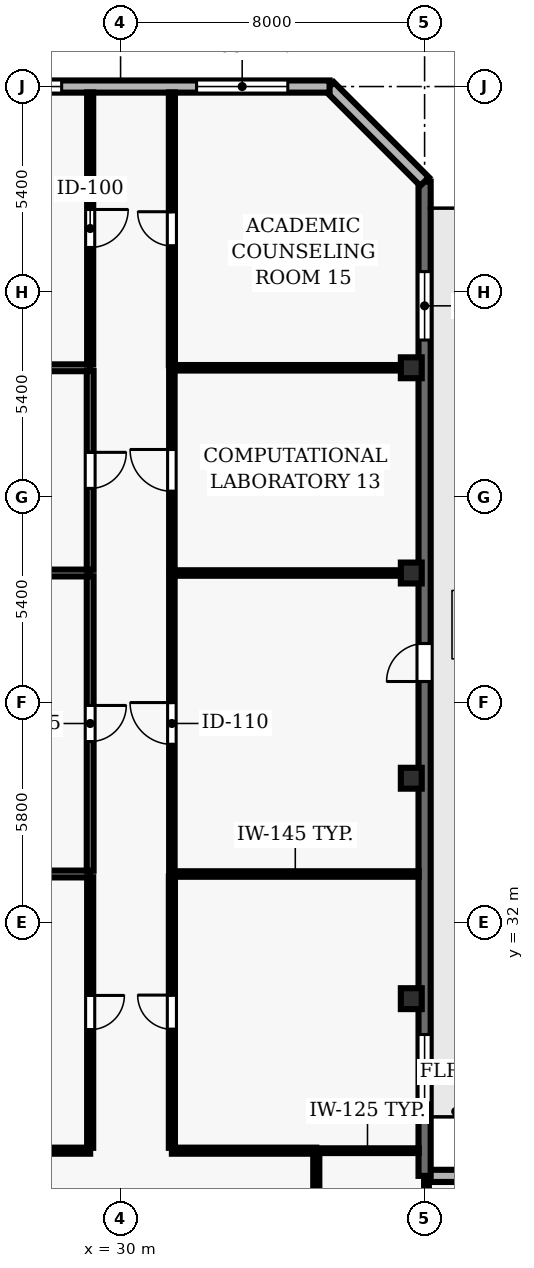
"""IFC4 building model, lengths in metres.
Left out: names, types, materials, properties, quantities, classifications, styles, units other than length and angle.
Written with IfcOpenShell. Run it as: python <this file> out.ifc"""

import sys

from ifc_helpers import new_model, si_unit, direction, frame, frame_2d, origin, origin_2d, place, context, subcontext, project, spatial, rectangle, hollow_rectangle, extrude, element, fill, save


model = new_model("IFC4")
c1 = context("Model", 3, precision=1e-05, world=origin(), true_north=direction((0.0, 1.0)))
c2 = subcontext(c1, "Body", "Model", "MODEL_VIEW")
j1 = project(units=[si_unit("LENGTHUNIT", "METRE"), si_unit("PLANEANGLEUNIT", "RADIAN")], contexts=[c1])
p1 = place(None, origin())
s1 = spatial("IfcSite", under=j1, at=p1, CompositionType="ELEMENT")
p2 = place(p1, origin())
s2 = spatial("IfcBuilding", under=s1, at=p2, CompositionType="ELEMENT")
p3 = place(p2, frame((0.0, 0.0, 77.8)))
s3 = spatial("IfcBuildingStorey", under=s2, at=p3, CompositionType="ELEMENT", Elevation=77.8)
for number, where, z_axis, x_axis in (
    (1, (37.65, 30.0, 0.0), (0.0, 0.0, 1.0), (1.0, 0.0, 0.0)),
    (2, (37.65, 35.8, 0.0), (0.0, 0.0, 1.0), (1.0, 0.0, 0.0)),
    (3, (37.65, 41.2, 0.0), (0.0, 0.0, 1.0), (1.0, 0.0, 0.0)),
    (4, (37.65, 46.6, 0.0), (0.0, 0.0, 1.0), (1.0, 0.0, 0.0)),
):
    element("IfcColumn", number, at=place(p3, frame(where, z_axis=z_axis, x_axis=x_axis)), inside=s3, PredefinedType="COLUMN", context=c2, shape_type="SweptSolid", body=[
        extrude(hollow_rectangle(XDim=0.55, YDim=0.55, WallThickness=0.025, at=origin_2d()), origin(), (0.0, 0.0, 1.0), 3.9),
    ])
p4 = place(p3, frame((47.05, 25.337, 0.0), z_axis=(0.0, 0.0, 1.0), x_axis=(-1.0, 0.0, 0.0)))
e5 = element("IfcWall", 5, at=p4, inside=s3, PredefinedType="SOLIDWALL", context=c2, shape_type="SweptSolid", body=[
    extrude(rectangle(XDim=9.05, YDim=0.32, at=frame_2d((4.525, 0.0))), origin(), (0.0, 0.0, 1.0), 3.69),
])
p5 = place(p4, frame((3.775, 0.0, 0.9)))
e6 = element("IfcOpeningElement", 6, at=p5, cuts=e5, PredefinedType="OPENING", context=c2, shape_type="SweptSolid", body=[
    extrude(rectangle(XDim=1.5, YDim=1.6, at=frame_2d((0.75, 0.8))), frame((0.0, 0.17, 0.0), z_axis=(0.0, -1.0, 0.0), x_axis=(1.0, 0.0, 0.0)), (0.0, 0.0, 1.0), 0.34),
])
p6 = place(p3, frame((38.0, 25.337, 0.0), z_axis=(0.0, 0.0, 1.0), x_axis=(0.0, 1.0, 0.0)))
e7 = element("IfcWall", 7, at=p6, inside=s3, PredefinedType="SOLIDWALL", context=c2, shape_type="SweptSolid", body=[
    extrude(rectangle(XDim=26.163, YDim=0.32, at=frame_2d((13.082, 0.0))), origin(), (0.0, 0.0, 1.0), 3.69),
])
p7 = place(p6, frame((13.008, 0.0, 0.0)))
e8 = element("IfcOpeningElement", 8, at=p7, cuts=e7, PredefinedType="OPENING", context=c2, shape_type="SweptSolid", body=[
    extrude(rectangle(XDim=1.0, YDim=2.2, at=frame_2d((0.5, 1.1))), frame((0.0, 0.17, 0.0), z_axis=(0.0, -1.0, 0.0), x_axis=(1.0, 0.0, 0.0)), (0.0, 0.0, 1.0), 0.34),
])
p8 = place(p6, frame((1.92, 0.0, 0.9)))
e9 = element("IfcOpeningElement", 9, at=p8, cuts=e7, PredefinedType="OPENING", context=c2, shape_type="SweptSolid", body=[
    extrude(rectangle(XDim=1.8, YDim=1.6, at=frame_2d((0.9, 0.8))), frame((0.0, 0.17, 0.0), z_axis=(0.0, -1.0, 0.0), x_axis=(1.0, 0.0, 0.0)), (0.0, 0.0, 1.0), 0.34),
])
p9 = place(p6, frame((21.993, 0.0, 0.9)))
e10 = element("IfcOpeningElement", 10, at=p9, cuts=e7, PredefinedType="OPENING", context=c2, shape_type="SweptSolid", body=[
    extrude(rectangle(XDim=1.8, YDim=1.6, at=frame_2d((0.9, 0.8))), frame((0.0, 0.17, 0.0), z_axis=(0.0, -1.0, 0.0), x_axis=(1.0, 0.0, 0.0)), (0.0, 0.0, 1.0), 0.34),
])
p10 = place(p3, frame((38.0, 51.5, 0.0), z_axis=(0.0, 0.0, 1.0), x_axis=(-0.707106781187, 0.707106781187, 0.0)))
e11 = element("IfcWall", 11, at=p10, inside=s3, PredefinedType="SOLIDWALL", context=c2, shape_type="SweptSolid", body=[
    extrude(rectangle(XDim=3.536, YDim=0.32, at=frame_2d((1.768, 0.0))), origin(), (0.0, 0.0, 1.0), 3.69),
])
p11 = place(p3, frame((35.5, 54.0, 0.0), z_axis=(0.0, 0.0, 1.0), x_axis=(-1.0, 0.0, 0.0)))
e12 = element("IfcWall", 12, at=p11, inside=s3, PredefinedType="SOLIDWALL", context=c2, shape_type="SweptSolid", body=[
    extrude(rectangle(XDim=11.0, YDim=0.32, at=frame_2d((5.5, 0.0))), origin(), (0.0, 0.0, 1.0), 3.69),
])
p12 = place(p11, frame((1.1, 0.0, 0.9)))
e13 = element("IfcOpeningElement", 13, at=p12, cuts=e12, PredefinedType="OPENING", context=c2, shape_type="SweptSolid", body=[
    extrude(rectangle(XDim=2.4, YDim=1.6, at=frame_2d((1.2, 0.8))), frame((0.0, 0.17, 0.0), z_axis=(0.0, -1.0, 0.0), x_axis=(1.0, 0.0, 0.0)), (0.0, 0.0, 1.0), 0.34),
])
p13 = place(p11, frame((7.05, 0.0, 0.9)))
e14 = element("IfcOpeningElement", 14, at=p13, cuts=e12, PredefinedType="OPENING", context=c2, shape_type="SweptSolid", body=[
    extrude(rectangle(XDim=2.4, YDim=1.6, at=frame_2d((1.2, 0.8))), frame((0.0, 0.17, 0.0), z_axis=(0.0, -1.0, 0.0), x_axis=(1.0, 0.0, 0.0)), (0.0, 0.0, 1.0), 0.34),
])
p14 = place(p3, frame((29.2, 26.0, 0.0), z_axis=(0.0, 0.0, 1.0), x_axis=(-1.0, 0.0, 0.0)))
e15 = element("IfcWall", 15, at=p14, inside=s3, PredefinedType="PARTITIONING", context=c2, shape_type="SweptSolid", body=[
    extrude(rectangle(XDim=7.045, YDim=0.16, at=frame_2d((3.522, 0.0))), origin(), (0.0, 0.0, 1.0), 3.69),
])
p15 = place(p3, frame((29.2, 33.28, 0.0), z_axis=(0.0, 0.0, 1.0), x_axis=(-1.0, 0.0, 0.0)))
e16 = element("IfcWall", 16, at=p15, inside=s3, PredefinedType="PARTITIONING", context=c2, shape_type="SweptSolid", body=[
    extrude(rectangle(XDim=7.045, YDim=0.18, at=frame_2d((3.522, 0.0))), origin(), (0.0, 0.0, 1.0), 3.227),
])
for number, where, z_axis, x_axis in (
    (17, (29.2, 41.2, 0.0), (0.0, 0.0, 1.0), (-1.0, 0.0, 0.0)),
    (18, (29.2, 46.6, 0.0), (0.0, 0.0, 1.0), (-1.0, 0.0, 0.0)),
):
    element("IfcWall", number, at=place(p3, frame(where, z_axis=z_axis, x_axis=x_axis)), inside=s3, PredefinedType="PARTITIONING", context=c2, shape_type="SweptSolid", body=[
        extrude(rectangle(XDim=7.045, YDim=0.18, at=frame_2d((3.522, 0.0))), origin(), (0.0, 0.0, 1.0), 2.995),
    ])
p16 = place(p3, frame((35.15, 26.0, 0.0), z_axis=(0.0, 0.0, 1.0), x_axis=(-1.0, 0.0, 0.0)))
e19 = element("IfcWall", 19, at=p16, inside=s3, PredefinedType="PARTITIONING", context=c2, shape_type="SweptSolid", body=[
    extrude(rectangle(XDim=3.8, YDim=0.16, at=frame_2d((1.9, 0.0))), origin(), (0.0, 0.0, 1.0), 3.69),
])
p17 = place(p3, frame((35.15, 26.0, 0.0), z_axis=(0.0, 0.0, 1.0), x_axis=(1.0, 0.0, 0.0)))
e20 = element("IfcWall", 20, at=p17, inside=s3, PredefinedType="PARTITIONING", context=c2, shape_type="SweptSolid", body=[
    extrude(rectangle(XDim=2.695, YDim=0.125, at=frame_2d((1.348, 0.0))), origin(), (0.0, 0.0, 1.0), 3.69),
])
p18 = place(p3, frame((37.845, 33.28, 0.0), z_axis=(0.0, 0.0, 1.0), x_axis=(-1.0, 0.0, 0.0)))
e21 = element("IfcWall", 21, at=p18, inside=s3, PredefinedType="PARTITIONING", context=c2, shape_type="SweptSolid", body=[
    extrude(rectangle(XDim=6.495, YDim=0.145, at=frame_2d((3.248, 0.0))), origin(), (0.0, 0.0, 1.0), 3.227),
])
for number, where, z_axis, x_axis in (
    (22, (37.845, 41.2, 0.0), (0.0, 0.0, 1.0), (-1.0, 0.0, 0.0)),
    (23, (37.845, 46.6, 0.0), (0.0, 0.0, 1.0), (-1.0, 0.0, 0.0)),
):
    element("IfcWall", number, at=place(p3, frame(where, z_axis=z_axis, x_axis=x_axis)), inside=s3, PredefinedType="PARTITIONING", context=c2, shape_type="SweptSolid", body=[
        extrude(rectangle(XDim=6.495, YDim=0.145, at=frame_2d((3.248, 0.0))), origin(), (0.0, 0.0, 1.0), 2.995),
    ])
p19 = place(p3, frame((29.2, 33.195, 0.0), z_axis=(0.0, 0.0, 1.0), x_axis=(0.0, -1.0, 0.0)))
e24 = element("IfcWall", 24, at=p19, inside=s3, PredefinedType="PARTITIONING", context=c2, shape_type="SweptSolid", body=[
    extrude(rectangle(XDim=7.12, YDim=0.16, at=frame_2d((3.56, 0.0))), origin(), (0.0, 0.0, 1.0), 3.69),
])
p20 = place(p19, frame((3.11, 0.0, 0.0)))
e25 = element("IfcOpeningElement", 25, at=p20, cuts=e24, PredefinedType="OPENING", context=c2, shape_type="SweptSolid", body=[
    extrude(rectangle(XDim=0.9, YDim=2.1, at=frame_2d((0.45, 1.05))), frame((0.0, 0.09, 0.0), z_axis=(0.0, -1.0, 0.0), x_axis=(1.0, 0.0, 0.0)), (0.0, 0.0, 1.0), 0.18),
])
p21 = place(p3, frame((29.2, 41.115, 0.0), z_axis=(0.0, 0.0, 1.0), x_axis=(0.0, -1.0, 0.0)))
e26 = element("IfcWall", 26, at=p21, inside=s3, PredefinedType="PARTITIONING", context=c2, shape_type="SweptSolid", body=[
    extrude(rectangle(XDim=7.75, YDim=0.18, at=frame_2d((3.875, 0.0))), origin(), (0.0, 0.0, 1.0), 3.69),
])
p22 = place(p21, frame((3.4, 0.0, 0.0)))
e27 = element("IfcOpeningElement", 27, at=p22, cuts=e26, PredefinedType="OPENING", context=c2, shape_type="SweptSolid", body=[
    extrude(rectangle(XDim=0.95, YDim=2.1, at=frame_2d((0.475, 1.05))), frame((0.0, 0.1, 0.0), z_axis=(0.0, -1.0, 0.0), x_axis=(1.0, 0.0, 0.0)), (0.0, 0.0, 1.0), 0.2),
])
p23 = place(p3, frame((29.2, 46.515, 0.0), z_axis=(0.0, 0.0, 1.0), x_axis=(0.0, -1.0, 0.0)))
e28 = element("IfcWall", 28, at=p23, inside=s3, PredefinedType="PARTITIONING", context=c2, shape_type="SweptSolid", body=[
    extrude(rectangle(XDim=5.23, YDim=0.18, at=frame_2d((2.615, 0.0))), origin(), (0.0, 0.0, 1.0), 3.69),
])
p24 = place(p23, frame((2.14, 0.0, 0.0)))
e29 = element("IfcOpeningElement", 29, at=p24, cuts=e28, PredefinedType="OPENING", context=c2, shape_type="SweptSolid", body=[
    extrude(rectangle(XDim=0.95, YDim=2.1, at=frame_2d((0.475, 1.05))), frame((0.0, 0.1, 0.0), z_axis=(0.0, -1.0, 0.0), x_axis=(1.0, 0.0, 0.0)), (0.0, 0.0, 1.0), 0.2),
])
p25 = place(p3, frame((29.2, 53.845, 0.0), z_axis=(0.0, 0.0, 1.0), x_axis=(0.0, -1.0, 0.0)))
e30 = element("IfcWall", 30, at=p25, inside=s3, PredefinedType="PARTITIONING", context=c2, shape_type="SweptSolid", body=[
    extrude(rectangle(XDim=7.16, YDim=0.16, at=frame_2d((3.58, 0.0))), origin(), (0.0, 0.0, 1.0), 3.69),
])
p26 = place(p25, frame((3.08, 0.0, 0.0)))
e31 = element("IfcOpeningElement", 31, at=p26, cuts=e30, PredefinedType="OPENING", context=c2, shape_type="SweptSolid", body=[
    extrude(rectangle(XDim=1.0, YDim=2.1, at=frame_2d((0.5, 1.05))), frame((0.0, 0.09, 0.0), z_axis=(0.0, -1.0, 0.0), x_axis=(1.0, 0.0, 0.0)), (0.0, 0.0, 1.0), 0.18),
])
p27 = place(p3, frame((31.35, 26.075, 0.0), z_axis=(0.0, 0.0, 1.0), x_axis=(0.0, 1.0, 0.0)))
e32 = element("IfcWall", 32, at=p27, inside=s3, PredefinedType="PARTITIONING", context=c2, shape_type="SweptSolid", body=[
    extrude(rectangle(XDim=7.137, YDim=0.16, at=frame_2d((3.568, 0.0))), origin(), (0.0, 0.0, 1.0), 3.69),
])
p28 = place(p27, frame((3.119, 0.0, 0.0)))
e33 = element("IfcOpeningElement", 33, at=p28, cuts=e32, PredefinedType="OPENING", context=c2, shape_type="SweptSolid", body=[
    extrude(rectangle(XDim=0.9, YDim=2.1, at=frame_2d((0.45, 1.05))), frame((0.0, 0.09, 0.0), z_axis=(0.0, -1.0, 0.0), x_axis=(1.0, 0.0, 0.0)), (0.0, 0.0, 1.0), 0.18),
])
p29 = place(p3, frame((31.35, 33.348, 0.0), z_axis=(0.0, 0.0, 1.0), x_axis=(0.0, 1.0, 0.0)))
e34 = element("IfcWall", 34, at=p29, inside=s3, PredefinedType="PARTITIONING", context=c2, shape_type="SweptSolid", body=[
    extrude(rectangle(XDim=7.785, YDim=0.145, at=frame_2d((3.893, 0.0))), origin(), (0.0, 0.0, 1.0), 3.69),
])
p30 = place(p29, frame((3.343, 0.0, 0.0)))
e35 = element("IfcOpeningElement", 35, at=p30, cuts=e34, PredefinedType="OPENING", context=c2, shape_type="SweptSolid", body=[
    extrude(rectangle(XDim=1.1, YDim=2.15, at=frame_2d((0.55, 1.075))), frame((0.0, 0.083, 0.0), z_axis=(0.0, -1.0, 0.0), x_axis=(1.0, 0.0, 0.0)), (0.0, 0.0, 1.0), 0.165),
])
p31 = place(p3, frame((31.35, 41.268, 0.0), z_axis=(0.0, 0.0, 1.0), x_axis=(0.0, 1.0, 0.0)))
e36 = element("IfcWall", 36, at=p31, inside=s3, PredefinedType="PARTITIONING", context=c2, shape_type="SweptSolid", body=[
    extrude(rectangle(XDim=5.264, YDim=0.145, at=frame_2d((2.632, 0.0))), origin(), (0.0, 0.0, 1.0), 3.69),
])
p32 = place(p31, frame((2.082, 0.0, 0.0)))
e37 = element("IfcOpeningElement", 37, at=p32, cuts=e36, PredefinedType="OPENING", context=c2, shape_type="SweptSolid", body=[
    extrude(rectangle(XDim=1.1, YDim=2.15, at=frame_2d((0.55, 1.075))), frame((0.0, 0.083, 0.0), z_axis=(0.0, -1.0, 0.0), x_axis=(1.0, 0.0, 0.0)), (0.0, 0.0, 1.0), 0.165),
])
p33 = place(p3, frame((31.35, 46.668, 0.0), z_axis=(0.0, 0.0, 1.0), x_axis=(0.0, 1.0, 0.0)))
e38 = element("IfcWall", 38, at=p33, inside=s3, PredefinedType="PARTITIONING", context=c2, shape_type="SweptSolid", body=[
    extrude(rectangle(XDim=7.177, YDim=0.16, at=frame_2d((3.588, 0.0))), origin(), (0.0, 0.0, 1.0), 3.69),
])
p34 = place(p33, frame((3.138, 0.0, 0.0)))
e39 = element("IfcOpeningElement", 39, at=p34, cuts=e38, PredefinedType="OPENING", context=c2, shape_type="SweptSolid", body=[
    extrude(rectangle(XDim=0.9, YDim=2.1, at=frame_2d((0.45, 1.05))), frame((0.0, 0.09, 0.0), z_axis=(0.0, -1.0, 0.0), x_axis=(1.0, 0.0, 0.0)), (0.0, 0.0, 1.0), 0.18),
])
p35 = place(p3, frame((35.15, 24.07, 0.0), z_axis=(0.0, 0.0, 1.0), x_axis=(0.0, 1.0, 0.0)))
e40 = element("IfcWall", 40, at=p35, inside=s3, PredefinedType="PARTITIONING", context=c2, shape_type="SweptSolid", body=[
    extrude(rectangle(XDim=1.855, YDim=0.16, at=frame_2d((0.927, 0.0))), origin(), (0.0, 0.0, 1.0), 3.69),
])
p36 = place(p3, frame((38.05, 25.182, 0.0), z_axis=(0.0, 0.0, 1.0), x_axis=(0.0, -1.0, 0.0)))
e41 = element("IfcWall", 41, at=p36, inside=s3, PredefinedType="PARTITIONING", context=c2, shape_type="SweptSolid", body=[
    extrude(rectangle(XDim=1.132, YDim=0.125, at=frame_2d((0.566, 0.0))), origin(), (0.0, 0.0, 1.0), 2.995),
])
p37 = place(p7, origin())
e42 = element("IfcDoor", 42, at=p37, inside=s3, OperationType="SINGLE_SWING_LEFT", PredefinedType="DOOR", context=c2, shape_type="SweptSolid", body=[
    extrude(rectangle(XDim=1.0, YDim=2.2, at=frame_2d((0.5, 1.1))), frame((0.0, 0.025, 0.0), z_axis=(0.0, -1.0, 0.0), x_axis=(1.0, 0.0, 0.0)), (0.0, 0.0, 1.0), 0.05),
])
fill(e8, e42)
p38 = place(p8, origin())
e43 = element("IfcWindow", 43, at=p38, inside=s3, PartitioningType="SINGLE_PANEL", PredefinedType="WINDOW", context=c2, shape_type="SweptSolid", body=[
    extrude(rectangle(XDim=1.8, YDim=1.6, at=frame_2d((0.9, 0.8))), frame((0.0, 0.03, 0.0), z_axis=(0.0, -1.0, 0.0), x_axis=(1.0, 0.0, 0.0)), (0.0, 0.0, 1.0), 0.06),
])
fill(e9, e43)
p39 = place(p9, origin())
e44 = element("IfcWindow", 44, at=p39, inside=s3, PartitioningType="SINGLE_PANEL", PredefinedType="WINDOW", context=c2, shape_type="SweptSolid", body=[
    extrude(rectangle(XDim=1.8, YDim=1.6, at=frame_2d((0.9, 0.8))), frame((0.0, 0.03, 0.0), z_axis=(0.0, -1.0, 0.0), x_axis=(1.0, 0.0, 0.0)), (0.0, 0.0, 1.0), 0.06),
])
fill(e10, e44)
p40 = place(p12, origin())
e45 = element("IfcWindow", 45, at=p40, inside=s3, PartitioningType="SINGLE_PANEL", PredefinedType="WINDOW", context=c2, shape_type="SweptSolid", body=[
    extrude(rectangle(XDim=2.4, YDim=1.6, at=frame_2d((1.2, 0.8))), frame((0.0, 0.03, 0.0), z_axis=(0.0, -1.0, 0.0), x_axis=(1.0, 0.0, 0.0)), (0.0, 0.0, 1.0), 0.06),
])
fill(e13, e45)
p41 = place(p13, origin())
e46 = element("IfcWindow", 46, at=p41, inside=s3, PartitioningType="SINGLE_PANEL", PredefinedType="WINDOW", context=c2, shape_type="SweptSolid", body=[
    extrude(rectangle(XDim=2.4, YDim=1.6, at=frame_2d((1.2, 0.8))), frame((0.0, 0.03, 0.0), z_axis=(0.0, -1.0, 0.0), x_axis=(1.0, 0.0, 0.0)), (0.0, 0.0, 1.0), 0.06),
])
fill(e14, e46)
p42 = place(p20, origin())
e47 = element("IfcDoor", 47, at=p42, inside=s3, OperationType="SINGLE_SWING_LEFT", PredefinedType="DOOR", context=c2, shape_type="SweptSolid", body=[
    extrude(rectangle(XDim=0.9, YDim=2.1, at=frame_2d((0.45, 1.05))), frame((0.0, 0.025, 0.0), z_axis=(0.0, -1.0, 0.0), x_axis=(1.0, 0.0, 0.0)), (0.0, 0.0, 1.0), 0.05),
])
fill(e25, e47)
p43 = place(p28, origin())
e48 = element("IfcDoor", 48, at=p43, inside=s3, OperationType="SINGLE_SWING_RIGHT", PredefinedType="DOOR", context=c2, shape_type="SweptSolid", body=[
    extrude(rectangle(XDim=0.9, YDim=2.1, at=frame_2d((0.45, 1.05))), frame((0.0, 0.025, 0.0), z_axis=(0.0, -1.0, 0.0), x_axis=(1.0, 0.0, 0.0)), (0.0, 0.0, 1.0), 0.05),
])
fill(e33, e48)
p44 = place(p22, origin())
e49 = element("IfcDoor", 49, at=p44, inside=s3, OperationType="SINGLE_SWING_LEFT", PredefinedType="DOOR", context=c2, shape_type="SweptSolid", body=[
    extrude(rectangle(XDim=0.95, YDim=2.1, at=frame_2d((0.475, 1.05))), frame((0.0, 0.025, 0.0), z_axis=(0.0, -1.0, 0.0), x_axis=(1.0, 0.0, 0.0)), (0.0, 0.0, 1.0), 0.05),
])
fill(e27, e49)
p45 = place(p30, origin())
e50 = element("IfcDoor", 50, at=p45, inside=s3, OperationType="SINGLE_SWING_RIGHT", PredefinedType="DOOR", context=c2, shape_type="SweptSolid", body=[
    extrude(rectangle(XDim=1.1, YDim=2.15, at=frame_2d((0.55, 1.075))), frame((0.0, 0.025, 0.0), z_axis=(0.0, -1.0, 0.0), x_axis=(1.0, 0.0, 0.0)), (0.0, 0.0, 1.0), 0.05),
])
fill(e35, e50)
p46 = place(p24, origin())
e51 = element("IfcDoor", 51, at=p46, inside=s3, OperationType="SINGLE_SWING_LEFT", PredefinedType="DOOR", context=c2, shape_type="SweptSolid", body=[
    extrude(rectangle(XDim=0.95, YDim=2.1, at=frame_2d((0.475, 1.05))), frame((0.0, 0.025, 0.0), z_axis=(0.0, -1.0, 0.0), x_axis=(1.0, 0.0, 0.0)), (0.0, 0.0, 1.0), 0.05),
])
fill(e29, e51)
p47 = place(p32, origin())
e52 = element("IfcDoor", 52, at=p47, inside=s3, OperationType="SINGLE_SWING_RIGHT", PredefinedType="DOOR", context=c2, shape_type="SweptSolid", body=[
    extrude(rectangle(XDim=1.1, YDim=2.15, at=frame_2d((0.55, 1.075))), frame((0.0, 0.025, 0.0), z_axis=(0.0, -1.0, 0.0), x_axis=(1.0, 0.0, 0.0)), (0.0, 0.0, 1.0), 0.05),
])
fill(e37, e52)
p48 = place(p26, origin())
e53 = element("IfcDoor", 53, at=p48, inside=s3, OperationType="SINGLE_SWING_LEFT", PredefinedType="DOOR", context=c2, shape_type="SweptSolid", body=[
    extrude(rectangle(XDim=1.0, YDim=2.1, at=frame_2d((0.5, 1.05))), frame((0.0, 0.025, 0.0), z_axis=(0.0, -1.0, 0.0), x_axis=(1.0, 0.0, 0.0)), (0.0, 0.0, 1.0), 0.05),
])
fill(e31, e53)
p49 = place(p34, origin())
e54 = element("IfcDoor", 54, at=p49, inside=s3, OperationType="SINGLE_SWING_RIGHT", PredefinedType="DOOR", context=c2, shape_type="SweptSolid", body=[
    extrude(rectangle(XDim=0.9, YDim=2.1, at=frame_2d((0.45, 1.05))), frame((0.0, 0.025, 0.0), z_axis=(0.0, -1.0, 0.0), x_axis=(1.0, 0.0, 0.0)), (0.0, 0.0, 1.0), 0.05),
])
fill(e39, e54)
save(model, sys.argv[1])
